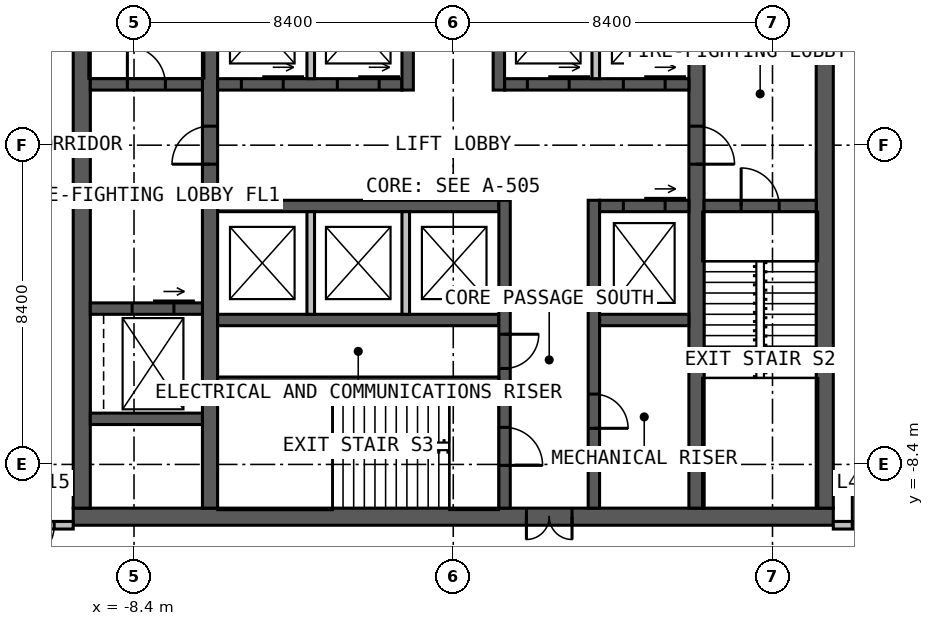
"""IFC4 building model, lengths in metres.
Left out: names, types, materials, properties, quantities, classifications, styles, units other than length and angle.
Written with IfcOpenShell. Run it as: python <this file> out.ifc"""

import sys

from ifc_helpers import new_model, si_unit, direction, frame, frame_2d, origin, place, context, subcontext, project, spatial, rectangle, extrude, element, fill, save


model = new_model("IFC4")
c1 = context("Model", 3, precision=1e-05, world=origin(), true_north=direction((0.0, 1.0)))
c2 = subcontext(c1, "Body", "Model", "MODEL_VIEW")
j1 = project(units=[si_unit("LENGTHUNIT", "METRE"), si_unit("PLANEANGLEUNIT", "RADIAN")], contexts=[c1])
p1 = place(None, origin())
s1 = spatial("IfcSite", under=j1, at=p1, CompositionType="ELEMENT")
p2 = place(p1, origin())
s2 = spatial("IfcBuilding", under=s1, at=p2, CompositionType="ELEMENT")
p3 = place(p2, frame((0.0, 0.0, 191.0)))
s3 = spatial("IfcBuildingStorey", under=s2, at=p3, CompositionType="ELEMENT", Elevation=191.0)
p4 = place(p3, frame((10.0, -9.775, 0.0), z_axis=(0.0, 0.0, 1.0), x_axis=(-1.0, 0.0, 0.0)))
e1 = element("IfcWall", 1, at=p4, inside=s3, PredefinedType="SOLIDWALL", context=c2, shape_type="SweptSolid", body=[
    extrude(rectangle(XDim=20.0, YDim=0.45, at=frame_2d((10.0, 0.0))), origin(), (0.0, 0.0, 1.0), 4.0),
])
p5 = place(p4, frame((6.875, 0.0, 0.0)))
e2 = element("IfcOpeningElement", 2, at=p5, cuts=e1, PredefinedType="OPENING", context=c2, shape_type="SweptSolid", body=[
    extrude(rectangle(XDim=1.2, YDim=2.2, at=frame_2d((0.6, 1.1))), frame((0.0, 0.235, 0.0), z_axis=(0.0, -1.0, 0.0), x_axis=(1.0, 0.0, 0.0)), (0.0, 0.0, 1.0), 0.47),
])
for number, where, z_axis, x_axis in (
    (3, (9.775, -9.55, 0.0), (0.0, 0.0, 1.0), (0.0, 1.0, 0.0)),
    (4, (-9.775, 9.55, 0.0), (0.0, 0.0, 1.0), (0.0, -1.0, 0.0)),
):
    element("IfcWall", number, at=place(p3, frame(where, z_axis=z_axis, x_axis=x_axis)), inside=s3, PredefinedType="SOLIDWALL", context=c2, shape_type="SweptSolid", body=[
        extrude(rectangle(XDim=19.1, YDim=0.45, at=frame_2d((9.55, 0.0))), origin(), (0.0, 0.0, 1.0), 4.0),
    ])
p6 = place(p3, frame((-6.4, -9.55, 0.0), z_axis=(0.0, 0.0, 1.0), x_axis=(0.0, 1.0, 0.0)))
e5 = element("IfcWall", 5, at=p6, inside=s3, PredefinedType="SOLIDWALL", context=c2, shape_type="SweptSolid", body=[
    extrude(rectangle(XDim=19.1, YDim=0.4, at=frame_2d((9.55, 0.0))), origin(), (0.0, 0.0, 1.0), 4.0),
])
p7 = place(p6, frame((9.05, 0.0, 0.0)))
e6 = element("IfcOpeningElement", 6, at=p7, cuts=e5, PredefinedType="OPENING", context=c2, shape_type="SweptSolid", body=[
    extrude(rectangle(XDim=1.0, YDim=2.2, at=frame_2d((0.5, 1.1))), frame((0.0, 0.21, 0.0), z_axis=(0.0, -1.0, 0.0), x_axis=(1.0, 0.0, 0.0)), (0.0, 0.0, 1.0), 0.42),
])
p8 = place(p3, frame((6.4, 9.55, 0.0), z_axis=(0.0, 0.0, 1.0), x_axis=(0.0, -1.0, 0.0)))
e7 = element("IfcWall", 7, at=p8, inside=s3, PredefinedType="SOLIDWALL", context=c2, shape_type="SweptSolid", body=[
    extrude(rectangle(XDim=19.1, YDim=0.4, at=frame_2d((9.55, 0.0))), origin(), (0.0, 0.0, 1.0), 4.0),
])
p9 = place(p8, frame((9.05, 0.0, 0.0)))
e8 = element("IfcOpeningElement", 8, at=p9, cuts=e7, PredefinedType="OPENING", context=c2, shape_type="SweptSolid", body=[
    extrude(rectangle(XDim=1.0, YDim=2.2, at=frame_2d((0.5, 1.1))), frame((0.0, 0.21, 0.0), z_axis=(0.0, -1.0, 0.0), x_axis=(1.0, 0.0, 0.0)), (0.0, 0.0, 1.0), 0.42),
])
p10 = place(p3, frame((-6.2, 1.6, 0.0), z_axis=(0.0, 0.0, 1.0), x_axis=(1.0, 0.0, 0.0)))
e9 = element("IfcWall", 9, at=p10, inside=s3, PredefinedType="SOLIDWALL", context=c2, shape_type="SweptSolid", body=[
    extrude(rectangle(XDim=4.85, YDim=0.3, at=frame_2d((2.425, 0.0))), origin(), (0.0, 0.0, 1.0), 4.0),
])
p11 = place(p10, frame((0.625, 0.0, 0.0)))
e10 = element("IfcOpeningElement", 10, at=p11, cuts=e9, PredefinedType="OPENING", context=c2, shape_type="SweptSolid", body=[
    extrude(rectangle(XDim=1.1, YDim=2.2, at=frame_2d((0.55, 1.1))), frame((0.0, 0.16, 0.0), z_axis=(0.0, -1.0, 0.0), x_axis=(1.0, 0.0, 0.0)), (0.0, 0.0, 1.0), 0.32),
])
p12 = place(p10, frame((3.15, 0.0, 0.0)))
e11 = element("IfcOpeningElement", 11, at=p12, cuts=e9, PredefinedType="OPENING", context=c2, shape_type="SweptSolid", body=[
    extrude(rectangle(XDim=1.1, YDim=2.2, at=frame_2d((0.55, 1.1))), frame((0.0, 0.16, 0.0), z_axis=(0.0, -1.0, 0.0), x_axis=(1.0, 0.0, 0.0)), (0.0, 0.0, 1.0), 0.32),
])
p13 = place(p3, frame((1.35, 1.6, 0.0), z_axis=(0.0, 0.0, 1.0), x_axis=(1.0, 0.0, 0.0)))
e12 = element("IfcWall", 12, at=p13, inside=s3, PredefinedType="SOLIDWALL", context=c2, shape_type="SweptSolid", body=[
    extrude(rectangle(XDim=4.85, YDim=0.3, at=frame_2d((2.425, 0.0))), origin(), (0.0, 0.0, 1.0), 4.0),
])
p14 = place(p13, frame((0.6, 0.0, 0.0)))
e13 = element("IfcOpeningElement", 13, at=p14, cuts=e12, PredefinedType="OPENING", context=c2, shape_type="SweptSolid", body=[
    extrude(rectangle(XDim=1.1, YDim=2.2, at=frame_2d((0.55, 1.1))), frame((0.0, 0.16, 0.0), z_axis=(0.0, -1.0, 0.0), x_axis=(1.0, 0.0, 0.0)), (0.0, 0.0, 1.0), 0.32),
])
p15 = place(p13, frame((3.125, 0.0, 0.0)))
e14 = element("IfcOpeningElement", 14, at=p15, cuts=e12, PredefinedType="OPENING", context=c2, shape_type="SweptSolid", body=[
    extrude(rectangle(XDim=1.1, YDim=2.2, at=frame_2d((0.55, 1.1))), frame((0.0, 0.16, 0.0), z_axis=(0.0, -1.0, 0.0), x_axis=(1.0, 0.0, 0.0)), (0.0, 0.0, 1.0), 0.32),
])
p16 = place(p3, frame((-1.2, 1.45, 0.0), z_axis=(0.0, 0.0, 1.0), x_axis=(0.0, 1.0, 0.0)))
e15 = element("IfcWall", 15, at=p16, inside=s3, PredefinedType="SOLIDWALL", context=c2, shape_type="SweptSolid", body=[
    extrude(rectangle(XDim=8.1, YDim=0.3, at=frame_2d((4.05, 0.0))), origin(), (0.0, 0.0, 1.0), 4.0),
])
p17 = place(p16, frame((5.05, 0.0, 0.0)))
e16 = element("IfcOpeningElement", 16, at=p17, cuts=e15, PredefinedType="OPENING", context=c2, shape_type="SweptSolid", body=[
    extrude(rectangle(XDim=1.0, YDim=2.2, at=frame_2d((0.5, 1.1))), frame((0.0, 0.16, 0.0), z_axis=(0.0, -1.0, 0.0), x_axis=(1.0, 0.0, 0.0)), (0.0, 0.0, 1.0), 0.32),
])
p18 = place(p3, frame((1.2, 1.45, 0.0), z_axis=(0.0, 0.0, 1.0), x_axis=(0.0, 1.0, 0.0)))
e17 = element("IfcWall", 17, at=p18, inside=s3, PredefinedType="SOLIDWALL", context=c2, shape_type="SweptSolid", body=[
    extrude(rectangle(XDim=8.1, YDim=0.3, at=frame_2d((4.05, 0.0))), origin(), (0.0, 0.0, 1.0), 4.0),
])
p19 = place(p18, frame((3.8, 0.0, 0.0)))
e18 = element("IfcOpeningElement", 18, at=p19, cuts=e17, PredefinedType="OPENING", context=c2, shape_type="SweptSolid", body=[
    extrude(rectangle(XDim=1.0, YDim=2.2, at=frame_2d((0.5, 1.1))), frame((0.0, 0.16, 0.0), z_axis=(0.0, -1.0, 0.0), x_axis=(1.0, 0.0, 0.0)), (0.0, 0.0, 1.0), 0.32),
])
p20 = place(p18, frame((6.15, 0.0, 0.0)))
e19 = element("IfcOpeningElement", 19, at=p20, cuts=e17, PredefinedType="OPENING", context=c2, shape_type="SweptSolid", body=[
    extrude(rectangle(XDim=1.0, YDim=2.2, at=frame_2d((0.5, 1.1))), frame((0.0, 0.16, 0.0), z_axis=(0.0, -1.0, 0.0), x_axis=(1.0, 0.0, 0.0)), (0.0, 0.0, 1.0), 0.32),
])
p21 = place(p3, frame((-6.2, -1.6, 0.0), z_axis=(0.0, 0.0, 1.0), x_axis=(1.0, 0.0, 0.0)))
e20 = element("IfcWall", 20, at=p21, inside=s3, PredefinedType="SOLIDWALL", context=c2, shape_type="SweptSolid", body=[
    extrude(rectangle(XDim=7.4, YDim=0.3, at=frame_2d((3.7, 0.0))), origin(), (0.0, 0.0, 1.0), 4.0),
])
p22 = place(p3, frame((3.85, -1.6, 0.0), z_axis=(0.0, 0.0, 1.0), x_axis=(1.0, 0.0, 0.0)))
e21 = element("IfcWall", 21, at=p22, inside=s3, PredefinedType="SOLIDWALL", context=c2, shape_type="SweptSolid", body=[
    extrude(rectangle(XDim=2.35, YDim=0.3, at=frame_2d((1.175, 0.0))), origin(), (0.0, 0.0, 1.0), 4.0),
])
p23 = place(p22, frame((0.625, 0.0, 0.0)))
e22 = element("IfcOpeningElement", 22, at=p23, cuts=e21, PredefinedType="OPENING", context=c2, shape_type="SweptSolid", body=[
    extrude(rectangle(XDim=1.1, YDim=2.2, at=frame_2d((0.55, 1.1))), frame((0.0, 0.16, 0.0), z_axis=(0.0, -1.0, 0.0), x_axis=(1.0, 0.0, 0.0)), (0.0, 0.0, 1.0), 0.32),
])
p24 = place(p3, frame((-6.2, -4.6, 0.0), z_axis=(0.0, 0.0, 1.0), x_axis=(1.0, 0.0, 0.0)))
e23 = element("IfcWall", 23, at=p24, inside=s3, PredefinedType="SOLIDWALL", context=c2, shape_type="SweptSolid", body=[
    extrude(rectangle(XDim=7.4, YDim=0.3, at=frame_2d((3.7, 0.0))), origin(), (0.0, 0.0, 1.0), 4.0),
])
p25 = place(p3, frame((3.85, -4.6, 0.0), z_axis=(0.0, 0.0, 1.0), x_axis=(1.0, 0.0, 0.0)))
e24 = element("IfcWall", 24, at=p25, inside=s3, PredefinedType="SOLIDWALL", context=c2, shape_type="SweptSolid", body=[
    extrude(rectangle(XDim=2.35, YDim=0.3, at=frame_2d((1.175, 0.0))), origin(), (0.0, 0.0, 1.0), 4.0),
])
p26 = place(p3, frame((1.35, -1.45, 0.0), z_axis=(0.0, 0.0, 1.0), x_axis=(0.0, -1.0, 0.0)))
e25 = element("IfcWall", 25, at=p26, inside=s3, PredefinedType="SOLIDWALL", context=c2, shape_type="SweptSolid", body=[
    extrude(rectangle(XDim=8.1, YDim=0.3, at=frame_2d((4.05, 0.0))), origin(), (0.0, 0.0, 1.0), 4.0),
])
p27 = place(p26, frame((5.975, 0.0, 0.0)))
e26 = element("IfcOpeningElement", 26, at=p27, cuts=e25, PredefinedType="OPENING", context=c2, shape_type="SweptSolid", body=[
    extrude(rectangle(XDim=1.0, YDim=2.2, at=frame_2d((0.5, 1.1))), frame((0.0, 0.16, 0.0), z_axis=(0.0, -1.0, 0.0), x_axis=(1.0, 0.0, 0.0)), (0.0, 0.0, 1.0), 0.32),
])
p28 = place(p26, frame((3.525, 0.0, 0.0)))
e27 = element("IfcOpeningElement", 27, at=p28, cuts=e25, PredefinedType="OPENING", context=c2, shape_type="SweptSolid", body=[
    extrude(rectangle(XDim=0.9, YDim=2.2, at=frame_2d((0.45, 1.1))), frame((0.0, 0.16, 0.0), z_axis=(0.0, -1.0, 0.0), x_axis=(1.0, 0.0, 0.0)), (0.0, 0.0, 1.0), 0.32),
])
p29 = place(p3, frame((3.7, -1.45, 0.0), z_axis=(0.0, 0.0, 1.0), x_axis=(0.0, -1.0, 0.0)))
e28 = element("IfcWall", 28, at=p29, inside=s3, PredefinedType="SOLIDWALL", context=c2, shape_type="SweptSolid", body=[
    extrude(rectangle(XDim=8.1, YDim=0.3, at=frame_2d((4.05, 0.0))), origin(), (0.0, 0.0, 1.0), 4.0),
])
p30 = place(p29, frame((5.1, 0.0, 0.0)))
e29 = element("IfcOpeningElement", 29, at=p30, cuts=e28, PredefinedType="OPENING", context=c2, shape_type="SweptSolid", body=[
    extrude(rectangle(XDim=0.9, YDim=2.2, at=frame_2d((0.45, 1.1))), frame((0.0, 0.16, 0.0), z_axis=(0.0, -1.0, 0.0), x_axis=(1.0, 0.0, 0.0)), (0.0, 0.0, 1.0), 0.32),
])
p31 = place(p3, frame((-6.2, -6.2, 0.0), z_axis=(0.0, 0.0, 1.0), x_axis=(1.0, 0.0, 0.0)))
e30 = element("IfcWall", 30, at=p31, inside=s3, PredefinedType="SOLIDWALL", context=c2, shape_type="SweptSolid", body=[
    extrude(rectangle(XDim=7.4, YDim=0.2, at=frame_2d((3.7, 0.0))), origin(), (0.0, 0.0, 1.0), 4.0),
])
p32 = place(p3, frame((-9.55, 1.6, 0.0), z_axis=(0.0, 0.0, 1.0), x_axis=(1.0, 0.0, 0.0)))
e31 = element("IfcWall", 31, at=p32, inside=s3, PredefinedType="SOLIDWALL", context=c2, shape_type="SweptSolid", body=[
    extrude(rectangle(XDim=2.95, YDim=0.3, at=frame_2d((1.475, 0.0))), origin(), (0.0, 0.0, 1.0), 4.0),
])
p33 = place(p32, frame((0.975, 0.0, 0.0)))
e32 = element("IfcOpeningElement", 32, at=p33, cuts=e31, PredefinedType="OPENING", context=c2, shape_type="SweptSolid", body=[
    extrude(rectangle(XDim=1.0, YDim=2.2, at=frame_2d((0.5, 1.1))), frame((0.0, 0.16, 0.0), z_axis=(0.0, -1.0, 0.0), x_axis=(1.0, 0.0, 0.0)), (0.0, 0.0, 1.0), 0.32),
])
p34 = place(p3, frame((6.6, -1.6, 0.0), z_axis=(0.0, 0.0, 1.0), x_axis=(1.0, 0.0, 0.0)))
e33 = element("IfcWall", 33, at=p34, inside=s3, PredefinedType="SOLIDWALL", context=c2, shape_type="SweptSolid", body=[
    extrude(rectangle(XDim=2.95, YDim=0.3, at=frame_2d((1.475, 0.0))), origin(), (0.0, 0.0, 1.0), 4.0),
])
p35 = place(p34, frame((0.975, 0.0, 0.0)))
e34 = element("IfcOpeningElement", 34, at=p35, cuts=e33, PredefinedType="OPENING", context=c2, shape_type="SweptSolid", body=[
    extrude(rectangle(XDim=1.0, YDim=2.2, at=frame_2d((0.5, 1.1))), frame((0.0, 0.16, 0.0), z_axis=(0.0, -1.0, 0.0), x_axis=(1.0, 0.0, 0.0)), (0.0, 0.0, 1.0), 0.32),
])
p36 = place(p3, frame((-9.55, -4.3, 0.0), z_axis=(0.0, 0.0, 1.0), x_axis=(1.0, 0.0, 0.0)))
e35 = element("IfcWall", 35, at=p36, inside=s3, PredefinedType="SOLIDWALL", context=c2, shape_type="SweptSolid", body=[
    extrude(rectangle(XDim=2.95, YDim=0.3, at=frame_2d((1.475, 0.0))), origin(), (0.0, 0.0, 1.0), 4.0),
])
p37 = place(p36, frame((1.1, 0.0, 0.0)))
e36 = element("IfcOpeningElement", 36, at=p37, cuts=e35, PredefinedType="OPENING", context=c2, shape_type="SweptSolid", body=[
    extrude(rectangle(XDim=1.1, YDim=2.2, at=frame_2d((0.55, 1.1))), frame((0.0, 0.16, 0.0), z_axis=(0.0, -1.0, 0.0), x_axis=(1.0, 0.0, 0.0)), (0.0, 0.0, 1.0), 0.32),
])
p38 = place(p3, frame((-9.55, -7.2, 0.0), z_axis=(0.0, 0.0, 1.0), x_axis=(1.0, 0.0, 0.0)))
e37 = element("IfcWall", 37, at=p38, inside=s3, PredefinedType="SOLIDWALL", context=c2, shape_type="SweptSolid", body=[
    extrude(rectangle(XDim=2.95, YDim=0.3, at=frame_2d((1.475, 0.0))), origin(), (0.0, 0.0, 1.0), 4.0),
])
for number, where, z_axis, x_axis in (
    (38, (-3.75, 1.75, 0.0), (0.0, 0.0, 1.0), (0.0, 1.0, 0.0)),
    (39, (3.75, 1.75, 0.0), (0.0, 0.0, 1.0), (0.0, 1.0, 0.0)),
    (40, (-3.75, -1.75, 0.0), (0.0, 0.0, 1.0), (0.0, -1.0, 0.0)),
    (41, (-1.25, -1.75, 0.0), (0.0, 0.0, 1.0), (0.0, -1.0, 0.0)),
):
    element("IfcWall", number, at=place(p3, frame(where, z_axis=z_axis, x_axis=x_axis)), inside=s3, PredefinedType="SOLIDWALL", context=c2, shape_type="SweptSolid", body=[
        extrude(rectangle(XDim=2.7, YDim=0.2, at=frame_2d((1.35, 0.0))), origin(), (0.0, 0.0, 1.0), 3.75),
    ])
p39 = place(p3, frame((10.0, -10.0, 0.0), z_axis=(0.0, 0.0, 1.0), x_axis=(1.0, 0.0, 0.0)))
e42 = element("IfcWall", 42, at=p39, inside=s3, PredefinedType="PARTITIONING", context=c2, shape_type="SweptSolid", body=[
    extrude(rectangle(XDim=2.0, YDim=0.2, at=frame_2d((1.0, 0.0))), origin(), (0.0, 0.0, 1.0), 3.8),
])
p40 = place(p39, frame((0.5, 0.0, 0.0)))
e43 = element("IfcOpeningElement", 43, at=p40, cuts=e42, PredefinedType="OPENING", context=c2, shape_type="SweptSolid", body=[
    extrude(rectangle(XDim=1.0, YDim=2.2, at=frame_2d((0.5, 1.1))), frame((0.0, 0.11, 0.0), z_axis=(0.0, -1.0, 0.0), x_axis=(1.0, 0.0, 0.0)), (0.0, 0.0, 1.0), 0.22),
])
p41 = place(p3, frame((-10.0, -10.0, 0.0), z_axis=(0.0, 0.0, 1.0), x_axis=(-1.0, 0.0, 0.0)))
e44 = element("IfcWall", 44, at=p41, inside=s3, PredefinedType="PARTITIONING", context=c2, shape_type="SweptSolid", body=[
    extrude(rectangle(XDim=2.0, YDim=0.2, at=frame_2d((1.0, 0.0))), origin(), (0.0, 0.0, 1.0), 3.8),
])
p42 = place(p41, frame((0.5, 0.0, 0.0)))
e45 = element("IfcOpeningElement", 45, at=p42, cuts=e44, PredefinedType="OPENING", context=c2, shape_type="SweptSolid", body=[
    extrude(rectangle(XDim=1.0, YDim=2.2, at=frame_2d((0.5, 1.1))), frame((0.0, 0.11, 0.0), z_axis=(0.0, -1.0, 0.0), x_axis=(1.0, 0.0, 0.0)), (0.0, 0.0, 1.0), 0.22),
])
p43 = place(p5, origin())
e46 = element("IfcDoor", 46, at=p43, inside=s3, OperationType="DOUBLE_DOOR_SINGLE_SWING", PredefinedType="DOOR", context=c2, shape_type="SweptSolid", body=[
    extrude(rectangle(XDim=1.2, YDim=2.2, at=frame_2d((0.6, 1.1))), frame((0.0, 0.025, 0.0), z_axis=(0.0, -1.0, 0.0), x_axis=(1.0, 0.0, 0.0)), (0.0, 0.0, 1.0), 0.05),
])
fill(e2, e46)
p44 = place(p7, origin())
e47 = element("IfcDoor", 47, at=p44, inside=s3, OperationType="SINGLE_SWING_LEFT", PredefinedType="DOOR", context=c2, shape_type="SweptSolid", body=[
    extrude(rectangle(XDim=1.0, YDim=2.2, at=frame_2d((0.5, 1.1))), frame((0.0, 0.025, 0.0), z_axis=(0.0, -1.0, 0.0), x_axis=(1.0, 0.0, 0.0)), (0.0, 0.0, 1.0), 0.05),
])
fill(e6, e47)
p45 = place(p9, origin())
e48 = element("IfcDoor", 48, at=p45, inside=s3, OperationType="SINGLE_SWING_RIGHT", PredefinedType="DOOR", context=c2, shape_type="SweptSolid", body=[
    extrude(rectangle(XDim=1.0, YDim=2.2, at=frame_2d((0.5, 1.1))), frame((0.0, 0.025, 0.0), z_axis=(0.0, -1.0, 0.0), x_axis=(1.0, 0.0, 0.0)), (0.0, 0.0, 1.0), 0.05),
])
fill(e8, e48)
p46 = place(p33, origin())
e49 = element("IfcDoor", 49, at=p46, inside=s3, OperationType="SINGLE_SWING_LEFT", PredefinedType="DOOR", context=c2, shape_type="SweptSolid", body=[
    extrude(rectangle(XDim=1.0, YDim=2.2, at=frame_2d((0.5, 1.1))), frame((0.0, 0.025, 0.0), z_axis=(0.0, -1.0, 0.0), x_axis=(1.0, 0.0, 0.0)), (0.0, 0.0, 1.0), 0.05),
])
fill(e32, e49)
p47 = place(p35, origin())
e50 = element("IfcDoor", 50, at=p47, inside=s3, OperationType="SINGLE_SWING_LEFT", PredefinedType="DOOR", context=c2, shape_type="SweptSolid", body=[
    extrude(rectangle(XDim=1.0, YDim=2.2, at=frame_2d((0.5, 1.1))), frame((0.0, 0.025, 0.0), z_axis=(0.0, -1.0, 0.0), x_axis=(1.0, 0.0, 0.0)), (0.0, 0.0, 1.0), 0.05),
])
fill(e34, e50)
p48 = place(p27, origin())
e51 = element("IfcDoor", 51, at=p48, inside=s3, OperationType="SINGLE_SWING_RIGHT", PredefinedType="DOOR", context=c2, shape_type="SweptSolid", body=[
    extrude(rectangle(XDim=1.0, YDim=2.2, at=frame_2d((0.5, 1.1))), frame((0.0, 0.025, 0.0), z_axis=(0.0, -1.0, 0.0), x_axis=(1.0, 0.0, 0.0)), (0.0, 0.0, 1.0), 0.05),
])
fill(e26, e51)
p49 = place(p28, origin())
e52 = element("IfcDoor", 52, at=p49, inside=s3, OperationType="SINGLE_SWING_LEFT", PredefinedType="DOOR", context=c2, shape_type="SweptSolid", body=[
    extrude(rectangle(XDim=0.9, YDim=2.2, at=frame_2d((0.45, 1.1))), frame((0.0, 0.025, 0.0), z_axis=(0.0, -1.0, 0.0), x_axis=(1.0, 0.0, 0.0)), (0.0, 0.0, 1.0), 0.05),
])
fill(e27, e52)
p50 = place(p30, origin())
e53 = element("IfcDoor", 53, at=p50, inside=s3, OperationType="SINGLE_SWING_RIGHT", PredefinedType="DOOR", context=c2, shape_type="SweptSolid", body=[
    extrude(rectangle(XDim=0.9, YDim=2.2, at=frame_2d((0.45, 1.1))), frame((0.0, 0.025, 0.0), z_axis=(0.0, -1.0, 0.0), x_axis=(1.0, 0.0, 0.0)), (0.0, 0.0, 1.0), 0.05),
])
fill(e29, e53)
p51 = place(p11, origin())
e54 = element("IfcDoor", 54, at=p51, inside=s3, OperationType="SLIDING_TO_LEFT", PredefinedType="DOOR", context=c2, shape_type="SweptSolid", body=[
    extrude(rectangle(XDim=1.1, YDim=2.2, at=frame_2d((0.55, 1.1))), frame((0.0, 0.025, 0.0), z_axis=(0.0, -1.0, 0.0), x_axis=(1.0, 0.0, 0.0)), (0.0, 0.0, 1.0), 0.05),
])
fill(e10, e54)
p52 = place(p12, origin())
e55 = element("IfcDoor", 55, at=p52, inside=s3, OperationType="SLIDING_TO_LEFT", PredefinedType="DOOR", context=c2, shape_type="SweptSolid", body=[
    extrude(rectangle(XDim=1.1, YDim=2.2, at=frame_2d((0.55, 1.1))), frame((0.0, 0.025, 0.0), z_axis=(0.0, -1.0, 0.0), x_axis=(1.0, 0.0, 0.0)), (0.0, 0.0, 1.0), 0.05),
])
fill(e11, e55)
p53 = place(p14, origin())
e56 = element("IfcDoor", 56, at=p53, inside=s3, OperationType="SLIDING_TO_LEFT", PredefinedType="DOOR", context=c2, shape_type="SweptSolid", body=[
    extrude(rectangle(XDim=1.1, YDim=2.2, at=frame_2d((0.55, 1.1))), frame((0.0, 0.025, 0.0), z_axis=(0.0, -1.0, 0.0), x_axis=(1.0, 0.0, 0.0)), (0.0, 0.0, 1.0), 0.05),
])
fill(e13, e56)
p54 = place(p15, origin())
e57 = element("IfcDoor", 57, at=p54, inside=s3, OperationType="SLIDING_TO_LEFT", PredefinedType="DOOR", context=c2, shape_type="SweptSolid", body=[
    extrude(rectangle(XDim=1.1, YDim=2.2, at=frame_2d((0.55, 1.1))), frame((0.0, 0.025, 0.0), z_axis=(0.0, -1.0, 0.0), x_axis=(1.0, 0.0, 0.0)), (0.0, 0.0, 1.0), 0.05),
])
fill(e14, e57)
p55 = place(p23, origin())
e58 = element("IfcDoor", 58, at=p55, inside=s3, OperationType="SLIDING_TO_LEFT", PredefinedType="DOOR", context=c2, shape_type="SweptSolid", body=[
    extrude(rectangle(XDim=1.1, YDim=2.2, at=frame_2d((0.55, 1.1))), frame((0.0, 0.025, 0.0), z_axis=(0.0, -1.0, 0.0), x_axis=(1.0, 0.0, 0.0)), (0.0, 0.0, 1.0), 0.05),
])
fill(e22, e58)
p56 = place(p37, origin())
e59 = element("IfcDoor", 59, at=p56, inside=s3, OperationType="SLIDING_TO_LEFT", PredefinedType="DOOR", context=c2, shape_type="SweptSolid", body=[
    extrude(rectangle(XDim=1.1, YDim=2.2, at=frame_2d((0.55, 1.1))), frame((0.0, 0.025, 0.0), z_axis=(0.0, -1.0, 0.0), x_axis=(1.0, 0.0, 0.0)), (0.0, 0.0, 1.0), 0.05),
])
fill(e36, e59)
p57 = place(p40, origin())
e60 = element("IfcDoor", 60, at=p57, inside=s3, OperationType="SINGLE_SWING_LEFT", PredefinedType="DOOR", context=c2, shape_type="SweptSolid", body=[
    extrude(rectangle(XDim=1.0, YDim=2.2, at=frame_2d((0.5, 1.1))), frame((0.0, 0.025, 0.0), z_axis=(0.0, -1.0, 0.0), x_axis=(1.0, 0.0, 0.0)), (0.0, 0.0, 1.0), 0.05),
])
fill(e43, e60)
p58 = place(p42, origin())
e61 = element("IfcDoor", 61, at=p58, inside=s3, OperationType="SINGLE_SWING_RIGHT", PredefinedType="DOOR", context=c2, shape_type="SweptSolid", body=[
    extrude(rectangle(XDim=1.0, YDim=2.2, at=frame_2d((0.5, 1.1))), frame((0.0, 0.025, 0.0), z_axis=(0.0, -1.0, 0.0), x_axis=(1.0, 0.0, 0.0)), (0.0, 0.0, 1.0), 0.05),
])
fill(e45, e61)
save(model, sys.argv[1])
